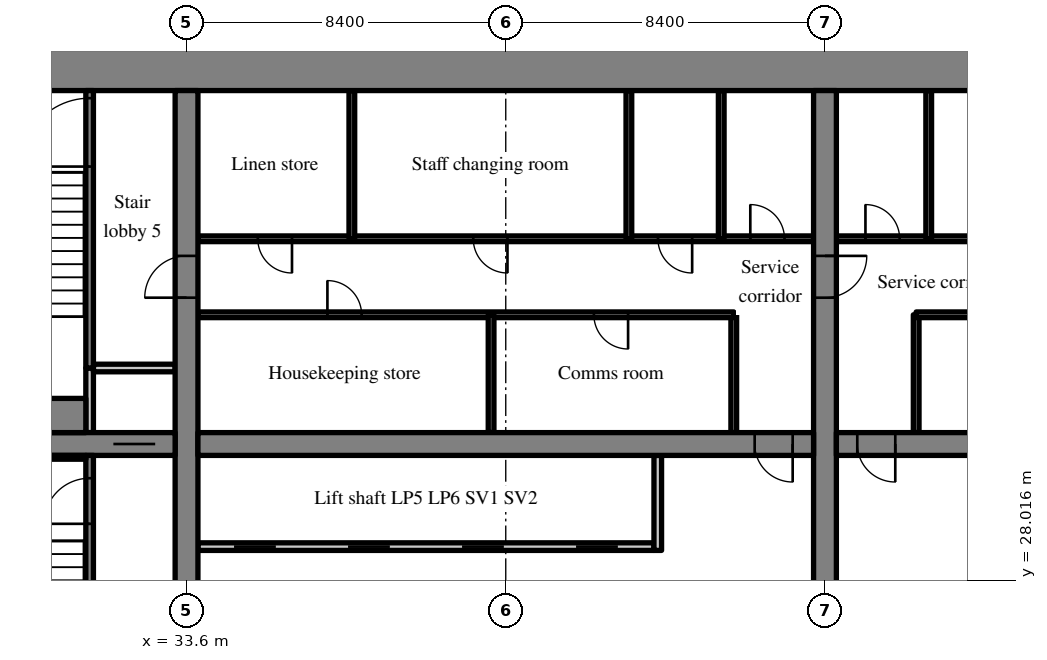
"""IFC4 building model, lengths in metres.
Left out: names, types, materials, properties, quantities, classifications, styles, units other than length and angle.
Written with IfcOpenShell. Run it as: python <this file> out.ifc"""

import sys

from ifc_helpers import new_model, si_unit, direction, frame, frame_2d, origin, place, context, subcontext, project, spatial, rectangle, extrude, source, transform, mapped, element, fill, save


model = new_model("IFC4")
c1 = context("Model", 3, precision=1e-05, world=origin(), true_north=direction((0.0, 1.0)))
c2 = subcontext(c1, "Body", "Model", "MODEL_VIEW")
j1 = project(units=[si_unit("LENGTHUNIT", "METRE"), si_unit("PLANEANGLEUNIT", "RADIAN")], contexts=[c1])
p1 = place(None, origin())
s1 = spatial("IfcSite", under=j1, at=p1, CompositionType="ELEMENT")
p2 = place(p1, origin())
s2 = spatial("IfcBuilding", under=s1, at=p2, CompositionType="ELEMENT")
p3 = place(p2, frame((0.0, 0.0, 31.6)))
s3 = spatial("IfcBuildingStorey", under=s2, at=p3, CompositionType="ELEMENT", Elevation=31.6)
m1 = source(origin(), c2, "Body", "SweptSolid", [
    extrude(rectangle(XDim=50.4, YDim=1.1, at=frame_2d((25.2, 0.0))), origin(), (0.0, 0.0, 1.0), 3.52),
])
p4 = place(p3, frame((25.2, 41.45, 0.0), z_axis=(0.0, 0.0, 1.0), x_axis=(1.0, 0.0, 0.0)))
e1 = element("IfcWall", 1, at=p4, inside=s3, PredefinedType="SHEAR", context=c2, shape_type="MappedRepresentation", body=[
    mapped(m1, transform((0.0, 0.0, 0.0), scale=1.0)),
])
m2 = source(origin(), c2, "Body", "SweptSolid", [
    extrude(rectangle(XDim=17.8, YDim=0.6, at=frame_2d((8.9, 0.0))), origin(), (0.0, 0.0, 1.0), 3.52),
])
p5 = place(p3, frame((33.6, 23.1, 0.0), z_axis=(0.0, 0.0, 1.0), x_axis=(0.0, 1.0, 0.0)))
e2 = element("IfcWall", 2, at=p5, inside=s3, PredefinedType="SHEAR", context=c2, shape_type="MappedRepresentation", body=[
    mapped(m2, transform((0.0, 0.0, 0.0), scale=1.0)),
])
m3 = source(origin(), c2, "Body", "SweptSolid", [
    extrude(rectangle(XDim=1.1, YDim=2.1, at=frame_2d((0.55, 1.05))), frame((0.0, 0.31, 0.0), z_axis=(0.0, -1.0, 0.0), x_axis=(1.0, 0.0, 0.0)), (0.0, 0.0, 1.0), 0.62),
])
p6 = place(p5, frame((12.35, 0.0, 0.0)))
e3 = element("IfcOpeningElement", 3, at=p6, cuts=e2, PredefinedType="OPENING", context=c2, shape_type="MappedRepresentation", body=[
    mapped(m3, transform((0.0, 0.0, 0.0), scale=1.0)),
])
p7 = place(p3, frame((50.4, 23.1, 0.0), z_axis=(0.0, 0.0, 1.0), x_axis=(0.0, 1.0, 0.0)))
e4 = element("IfcWall", 4, at=p7, inside=s3, PredefinedType="SHEAR", context=c2, shape_type="MappedRepresentation", body=[
    mapped(m2, transform((0.0, 0.0, 0.0), scale=1.0)),
])
p8 = place(p7, frame((12.35, 0.0, 0.0)))
e5 = element("IfcOpeningElement", 5, at=p8, cuts=e4, PredefinedType="OPENING", context=c2, shape_type="MappedRepresentation", body=[
    mapped(m3, transform((0.0, 0.0, 0.0), scale=1.0)),
])
m4 = source(origin(), c2, "Body", "SweptSolid", [
    extrude(rectangle(XDim=7.0, YDim=0.6, at=frame_2d((3.5, 0.0))), origin(), (0.0, 0.0, 1.0), 3.52),
])
p9 = place(p3, frame((26.3, 31.6, 0.0), z_axis=(0.0, 0.0, 1.0), x_axis=(1.0, 0.0, 0.0)))
e6 = element("IfcWall", 6, at=p9, inside=s3, PredefinedType="SHEAR", context=c2, shape_type="MappedRepresentation", body=[
    mapped(m4, transform((0.0, 0.0, 0.0), scale=1.0)),
])
p10 = place(p9, frame((5.375, 0.0, 0.0)))
e7 = element("IfcOpeningElement", 7, at=p10, cuts=e6, PredefinedType="OPENING", context=c2, shape_type="MappedRepresentation", body=[
    mapped(m3, transform((0.0, 0.0, 0.0), scale=1.0)),
])
m5 = source(origin(), c2, "Body", "SweptSolid", [
    extrude(rectangle(XDim=16.2, YDim=0.6, at=frame_2d((8.1, 0.0))), origin(), (0.0, 0.0, 1.0), 3.52),
])
p11 = place(p3, frame((33.9, 31.6, 0.0), z_axis=(0.0, 0.0, 1.0), x_axis=(1.0, 0.0, 0.0)))
e8 = element("IfcWall", 8, at=p11, inside=s3, PredefinedType="SHEAR", context=c2, shape_type="MappedRepresentation", body=[
    mapped(m5, transform((0.0, 0.0, 0.0), scale=1.0)),
])
m6 = source(origin(), c2, "Body", "SweptSolid", [
    extrude(rectangle(XDim=1.0, YDim=2.1, at=frame_2d((0.5, 1.05))), frame((0.0, 0.31, 0.0), z_axis=(0.0, -1.0, 0.0), x_axis=(1.0, 0.0, 0.0)), (0.0, 0.0, 1.0), 0.62),
])
p12 = place(p11, frame((14.65, 0.0, 0.0)))
e9 = element("IfcOpeningElement", 9, at=p12, cuts=e8, PredefinedType="OPENING", context=c2, shape_type="MappedRepresentation", body=[
    mapped(m6, transform((0.0, 0.0, 0.0), scale=1.0)),
])
m7 = source(origin(), c2, "Body", "SweptSolid", [
    extrude(rectangle(XDim=16.2, YDim=0.6, at=frame_2d((8.1, 0.0))), origin(), (0.0, 0.0, 1.0), 3.52),
])
p13 = place(p3, frame((50.7, 31.6, 0.0), z_axis=(0.0, 0.0, 1.0), x_axis=(1.0, 0.0, 0.0)))
e10 = element("IfcWall", 10, at=p13, inside=s3, PredefinedType="SHEAR", context=c2, shape_type="MappedRepresentation", body=[
    mapped(m7, transform((0.0, 0.0, 0.0), scale=1.0)),
])
p14 = place(p13, frame((0.55, 0.0, 0.0)))
e11 = element("IfcOpeningElement", 11, at=p14, cuts=e10, PredefinedType="OPENING", context=c2, shape_type="MappedRepresentation", body=[
    mapped(m6, transform((0.0, 0.0, 0.0), scale=1.0)),
])
m8 = source(origin(), c2, "Body", "SweptSolid", [
    extrude(rectangle(XDim=12.0, YDim=0.2, at=frame_2d((6.0, 0.0))), origin(), (0.0, 0.0, 1.0), 3.52),
])
p15 = place(p3, frame((33.9, 28.9, 0.0), z_axis=(0.0, 0.0, 1.0), x_axis=(1.0, 0.0, 0.0)))
e12 = element("IfcWall", 12, at=p15, inside=s3, PredefinedType="SOLIDWALL", context=c2, shape_type="MappedRepresentation", body=[
    mapped(m8, transform((0.0, 0.0, 0.0), scale=1.0)),
])
m9 = source(origin(), c2, "Body", "SweptSolid", [
    extrude(rectangle(XDim=1.1, YDim=2.1, at=frame_2d((0.55, 1.05))), frame((0.0, 0.11, 0.0), z_axis=(0.0, -1.0, 0.0), x_axis=(1.0, 0.0, 0.0)), (0.0, 0.0, 1.0), 0.22),
])
p16 = place(p15, frame((0.95, 0.0, 0.0)))
e13 = element("IfcOpeningElement", 13, at=p16, cuts=e12, PredefinedType="OPENING", context=c2, shape_type="MappedRepresentation", body=[
    mapped(m9, transform((0.0, 0.0, 0.0), scale=1.0)),
])
p17 = place(p15, frame((3.95, 0.0, 0.0)))
e14 = element("IfcOpeningElement", 14, at=p17, cuts=e12, PredefinedType="OPENING", context=c2, shape_type="MappedRepresentation", body=[
    mapped(m9, transform((0.0, 0.0, 0.0), scale=1.0)),
])
p18 = place(p15, frame((6.95, 0.0, 0.0)))
e15 = element("IfcOpeningElement", 15, at=p18, cuts=e12, PredefinedType="OPENING", context=c2, shape_type="MappedRepresentation", body=[
    mapped(m9, transform((0.0, 0.0, 0.0), scale=1.0)),
])
p19 = place(p15, frame((9.95, 0.0, 0.0)))
e16 = element("IfcOpeningElement", 16, at=p19, cuts=e12, PredefinedType="OPENING", context=c2, shape_type="MappedRepresentation", body=[
    mapped(m9, transform((0.0, 0.0, 0.0), scale=1.0)),
])
m10 = source(origin(), c2, "Body", "SweptSolid", [
    extrude(rectangle(XDim=2.5, YDim=0.2, at=frame_2d((1.25, 0.0))), origin(), (0.0, 0.0, 1.0), 3.52),
])
p20 = place(p3, frame((46.0, 28.8, 0.0), z_axis=(0.0, 0.0, 1.0), x_axis=(0.0, 1.0, 0.0)))
e17 = element("IfcWall", 17, at=p20, inside=s3, PredefinedType="SOLIDWALL", context=c2, shape_type="MappedRepresentation", body=[
    mapped(m10, transform((0.0, 0.0, 0.0), scale=1.0)),
])
m11 = source(origin(), c2, "Body", "SweptSolid", [
    extrude(rectangle(XDim=3.1, YDim=0.15, at=frame_2d((1.55, 0.0))), origin(), (0.0, 0.0, 1.0), 3.52),
])
p21 = place(p3, frame((48.0, 31.9, 0.0), z_axis=(0.0, 0.0, 1.0), x_axis=(0.0, 1.0, 0.0)))
e18 = element("IfcWall", 18, at=p21, inside=s3, PredefinedType="PARTITIONING", context=c2, shape_type="MappedRepresentation", body=[
    mapped(m11, transform((0.0, 0.0, 0.0), scale=1.0)),
])
m12 = source(origin(), c2, "Body", "SweptSolid", [
    extrude(rectangle(XDim=14.1, YDim=0.15, at=frame_2d((7.05, 0.0))), origin(), (0.0, 0.0, 1.0), 3.52),
])
p22 = place(p3, frame((33.9, 35.0, 0.0), z_axis=(0.0, 0.0, 1.0), x_axis=(1.0, 0.0, 0.0)))
e19 = element("IfcWall", 19, at=p22, inside=s3, PredefinedType="PARTITIONING", context=c2, shape_type="MappedRepresentation", body=[
    mapped(m12, transform((0.0, 0.0, 0.0), scale=1.0)),
])
m13 = source(origin(), c2, "Body", "SweptSolid", [
    extrude(rectangle(XDim=0.9, YDim=2.1, at=frame_2d((0.45, 1.05))), frame((0.0, 0.085, 0.0), z_axis=(0.0, -1.0, 0.0), x_axis=(1.0, 0.0, 0.0)), (0.0, 0.0, 1.0), 0.17),
])
p23 = place(p22, frame((3.407, 0.0, 0.0)))
e20 = element("IfcOpeningElement", 20, at=p23, cuts=e19, PredefinedType="OPENING", context=c2, shape_type="MappedRepresentation", body=[
    mapped(m13, transform((0.0, 0.0, 0.0), scale=1.0)),
])
p24 = place(p22, frame((10.419, 0.0, 0.0)))
e21 = element("IfcOpeningElement", 21, at=p24, cuts=e19, PredefinedType="OPENING", context=c2, shape_type="MappedRepresentation", body=[
    mapped(m13, transform((0.0, 0.0, 0.0), scale=1.0)),
])
m14 = source(origin(), c2, "Body", "SweptSolid", [
    extrude(rectangle(XDim=16.2, YDim=0.15, at=frame_2d((8.1, 0.0))), origin(), (0.0, 0.0, 1.0), 3.52),
])
p25 = place(p3, frame((33.9, 37.0, 0.0), z_axis=(0.0, 0.0, 1.0), x_axis=(1.0, 0.0, 0.0)))
e22 = element("IfcWall", 22, at=p25, inside=s3, PredefinedType="PARTITIONING", context=c2, shape_type="MappedRepresentation", body=[
    mapped(m14, transform((0.0, 0.0, 0.0), scale=1.0)),
])
p26 = place(p25, frame((1.575, 0.0, 0.0)))
e23 = element("IfcOpeningElement", 23, at=p26, cuts=e22, PredefinedType="OPENING", context=c2, shape_type="MappedRepresentation", body=[
    mapped(m13, transform((0.0, 0.0, 0.0), scale=1.0)),
])
p27 = place(p25, frame((7.245, 0.0, 0.0)))
e24 = element("IfcOpeningElement", 24, at=p27, cuts=e22, PredefinedType="OPENING", context=c2, shape_type="MappedRepresentation", body=[
    mapped(m13, transform((0.0, 0.0, 0.0), scale=1.0)),
])
p28 = place(p25, frame((12.105, 0.0, 0.0)))
e25 = element("IfcOpeningElement", 25, at=p28, cuts=e22, PredefinedType="OPENING", context=c2, shape_type="MappedRepresentation", body=[
    mapped(m13, transform((0.0, 0.0, 0.0), scale=1.0)),
])
p29 = place(p25, frame((14.535, 0.0, 0.0)))
e26 = element("IfcOpeningElement", 26, at=p29, cuts=e22, PredefinedType="OPENING", context=c2, shape_type="MappedRepresentation", body=[
    mapped(m13, transform((0.0, 0.0, 0.0), scale=1.0)),
])
p30 = place(p3, frame((41.614, 31.9, 0.0), z_axis=(0.0, 0.0, 1.0), x_axis=(0.0, 1.0, 0.0)))
e27 = element("IfcWall", 27, at=p30, inside=s3, PredefinedType="PARTITIONING", context=c2, shape_type="MappedRepresentation", body=[
    mapped(m11, transform((0.0, 0.0, 0.0), scale=1.0)),
])
m15 = source(origin(), c2, "Body", "SweptSolid", [
    extrude(rectangle(XDim=3.9, YDim=0.15, at=frame_2d((1.95, 0.0))), origin(), (0.0, 0.0, 1.0), 3.52),
])
for number, where, z_axis, x_axis in (
    (28, (37.95, 37.0, 0.0), (0.0, 0.0, 1.0), (0.0, 1.0, 0.0)),
    (29, (45.24, 37.0, 0.0), (0.0, 0.0, 1.0), (0.0, 1.0, 0.0)),
    (30, (47.67, 37.0, 0.0), (0.0, 0.0, 1.0), (0.0, 1.0, 0.0)),
):
    element("IfcWall", number, at=place(p3, frame(where, z_axis=z_axis, x_axis=x_axis)), inside=s3, PredefinedType="PARTITIONING", context=c2, shape_type="MappedRepresentation", body=[
        mapped(m15, transform((0.0, 0.0, 0.0), scale=1.0)),
    ])
p31 = place(p3, frame((52.8, 31.9, 0.0), z_axis=(0.0, 0.0, 1.0), x_axis=(0.0, 1.0, 0.0)))
e31 = element("IfcWall", 31, at=p31, inside=s3, PredefinedType="PARTITIONING", context=c2, shape_type="MappedRepresentation", body=[
    mapped(m11, transform((0.0, 0.0, 0.0), scale=1.0)),
])
m16 = source(origin(), c2, "Body", "SweptSolid", [
    extrude(rectangle(XDim=14.1, YDim=0.15, at=frame_2d((7.05, 0.0))), origin(), (0.0, 0.0, 1.0), 3.52),
])
p32 = place(p3, frame((66.9, 35.0, 0.0), z_axis=(0.0, 0.0, 1.0), x_axis=(-1.0, 0.0, 0.0)))
e32 = element("IfcWall", 32, at=p32, inside=s3, PredefinedType="PARTITIONING", context=c2, shape_type="MappedRepresentation", body=[
    mapped(m16, transform((0.0, 0.0, 0.0), scale=1.0)),
])
p33 = place(p32, frame((6.562, 0.0, 0.0)))
e33 = element("IfcOpeningElement", 33, at=p33, cuts=e32, PredefinedType="OPENING", context=c2, shape_type="MappedRepresentation", body=[
    mapped(m13, transform((0.0, 0.0, 0.0), scale=1.0)),
])
m17 = source(origin(), c2, "Body", "SweptSolid", [
    extrude(rectangle(XDim=16.2, YDim=0.15, at=frame_2d((8.1, 0.0))), origin(), (0.0, 0.0, 1.0), 3.52),
])
p34 = place(p3, frame((66.9, 37.0, 0.0), z_axis=(0.0, 0.0, 1.0), x_axis=(-1.0, 0.0, 0.0)))
e34 = element("IfcWall", 34, at=p34, inside=s3, PredefinedType="PARTITIONING", context=c2, shape_type="MappedRepresentation", body=[
    mapped(m17, transform((0.0, 0.0, 0.0), scale=1.0)),
])
p35 = place(p34, frame((3.195, 0.0, 0.0)))
e35 = element("IfcOpeningElement", 35, at=p35, cuts=e34, PredefinedType="OPENING", context=c2, shape_type="MappedRepresentation", body=[
    mapped(m13, transform((0.0, 0.0, 0.0), scale=1.0)),
])
p36 = place(p34, frame((8.055, 0.0, 0.0)))
e36 = element("IfcOpeningElement", 36, at=p36, cuts=e34, PredefinedType="OPENING", context=c2, shape_type="MappedRepresentation", body=[
    mapped(m13, transform((0.0, 0.0, 0.0), scale=1.0)),
])
p37 = place(p34, frame((11.295, 0.0, 0.0)))
e37 = element("IfcOpeningElement", 37, at=p37, cuts=e34, PredefinedType="OPENING", context=c2, shape_type="MappedRepresentation", body=[
    mapped(m13, transform((0.0, 0.0, 0.0), scale=1.0)),
])
p38 = place(p34, frame((14.535, 0.0, 0.0)))
e38 = element("IfcOpeningElement", 38, at=p38, cuts=e34, PredefinedType="OPENING", context=c2, shape_type="MappedRepresentation", body=[
    mapped(m13, transform((0.0, 0.0, 0.0), scale=1.0)),
])
p39 = place(p3, frame((53.13, 37.0, 0.0), z_axis=(0.0, 0.0, 1.0), x_axis=(0.0, 1.0, 0.0)))
e39 = element("IfcWall", 39, at=p39, inside=s3, PredefinedType="PARTITIONING", context=c2, shape_type="MappedRepresentation", body=[
    mapped(m15, transform((0.0, 0.0, 0.0), scale=1.0)),
])
m18 = source(origin(), c2, "Body", "SweptSolid", [
    extrude(rectangle(XDim=8.2, YDim=0.2, at=frame_2d((4.1, 0.0))), origin(), (0.0, 0.0, 1.0), 3.52),
])
p40 = place(p3, frame((31.05, 23.1, 0.0), z_axis=(0.0, 0.0, 1.0), x_axis=(0.0, 1.0, 0.0)))
e40 = element("IfcWall", 40, at=p40, inside=s3, PredefinedType="SOLIDWALL", context=c2, shape_type="MappedRepresentation", body=[
    mapped(m18, transform((0.0, 0.0, 0.0), scale=1.0)),
])
m19 = source(origin(), c2, "Body", "SweptSolid", [
    extrude(rectangle(XDim=1.2, YDim=2.1, at=frame_2d((0.6, 1.05))), frame((0.0, 0.11, 0.0), z_axis=(0.0, -1.0, 0.0), x_axis=(1.0, 0.0, 0.0)), (0.0, 0.0, 1.0), 0.22),
])
p41 = place(p40, frame((6.4, 0.0, 0.0)))
e41 = element("IfcOpeningElement", 41, at=p41, cuts=e40, PredefinedType="OPENING", context=c2, shape_type="MappedRepresentation", body=[
    mapped(m19, transform((0.0, 0.0, 0.0), scale=1.0)),
])
m20 = source(origin(), c2, "Body", "SweptSolid", [
    extrude(rectangle(XDim=1.7, YDim=0.2, at=frame_2d((0.85, 0.0))), origin(), (0.0, 0.0, 1.0), 3.52),
])
p42 = place(p3, frame((31.05, 31.9, 0.0), z_axis=(0.0, 0.0, 1.0), x_axis=(0.0, 1.0, 0.0)))
e42 = element("IfcWall", 42, at=p42, inside=s3, PredefinedType="SOLIDWALL", context=c2, shape_type="MappedRepresentation", body=[
    mapped(m20, transform((0.0, 0.0, 0.0), scale=1.0)),
])
m21 = source(origin(), c2, "Body", "SweptSolid", [
    extrude(rectangle(XDim=2.15, YDim=0.2, at=frame_2d((1.075, 0.0))), origin(), (0.0, 0.0, 1.0), 3.52),
])
p43 = place(p3, frame((31.15, 33.6, 0.0), z_axis=(0.0, 0.0, 1.0), x_axis=(1.0, 0.0, 0.0)))
e43 = element("IfcWall", 43, at=p43, inside=s3, PredefinedType="SOLIDWALL", context=c2, shape_type="MappedRepresentation", body=[
    mapped(m21, transform((0.0, 0.0, 0.0), scale=1.0)),
])
m22 = source(origin(), c2, "Body", "SweptSolid", [
    extrude(rectangle(XDim=7.3, YDim=0.2, at=frame_2d((3.65, 0.0))), origin(), (0.0, 0.0, 1.0), 3.52),
])
p44 = place(p3, frame((31.05, 33.6, 0.0), z_axis=(0.0, 0.0, 1.0), x_axis=(0.0, 1.0, 0.0)))
e44 = element("IfcWall", 44, at=p44, inside=s3, PredefinedType="SOLIDWALL", context=c2, shape_type="MappedRepresentation", body=[
    mapped(m22, transform((0.0, 0.0, 0.0), scale=1.0)),
])
m23 = source(origin(), c2, "Body", "SweptSolid", [
    extrude(rectangle(XDim=1.8, YDim=2.1, at=frame_2d((0.9, 1.05))), frame((0.0, 0.11, 0.0), z_axis=(0.0, -1.0, 0.0), x_axis=(1.0, 0.0, 0.0)), (0.0, 0.0, 1.0), 0.22),
])
p45 = place(p44, frame((5.3, 0.0, 0.0)))
e45 = element("IfcOpeningElement", 45, at=p45, cuts=e44, PredefinedType="OPENING", context=c2, shape_type="MappedRepresentation", body=[
    mapped(m23, transform((0.0, 0.0, 0.0), scale=1.0)),
])
m24 = source(origin(), c2, "Body", "SweptSolid", [
    extrude(rectangle(XDim=4.65, YDim=0.1, at=frame_2d((2.325, 0.0))), origin(), (0.0, 0.0, 1.0), 3.52),
])
p46 = place(p3, frame((26.3, 31.25, 0.0), z_axis=(0.0, 0.0, 1.0), x_axis=(1.0, 0.0, 0.0)))
e46 = element("IfcWall", 46, at=p46, inside=s3, PredefinedType="SOLIDWALL", context=c2, shape_type="MappedRepresentation", body=[
    mapped(m24, transform((0.0, 0.0, 0.0), scale=1.0)),
])
m25 = source(origin(), c2, "Body", "SweptSolid", [
    extrude(rectangle(XDim=4.65, YDim=0.9, at=frame_2d((2.325, 0.0))), origin(), (0.0, 0.0, 1.0), 3.52),
])
p47 = place(p3, frame((26.3, 32.35, 0.0), z_axis=(0.0, 0.0, 1.0), x_axis=(1.0, 0.0, 0.0)))
e47 = element("IfcWall", 47, at=p47, inside=s3, PredefinedType="SOLIDWALL", context=c2, shape_type="MappedRepresentation", body=[
    mapped(m25, transform((0.0, 0.0, 0.0), scale=1.0)),
])
m26 = source(origin(), c2, "Body", "SweptSolid", [
    extrude(rectangle(XDim=1.0, YDim=2.1, at=frame_2d((0.5, 1.05))), frame((0.0, 0.025, 0.0), z_axis=(0.0, -1.0, 0.0), x_axis=(1.0, 0.0, 0.0)), (0.0, 0.0, 1.0), 0.05),
])
p48 = place(p12, origin())
e48 = element("IfcDoor", 48, at=p48, inside=s3, OperationType="SINGLE_SWING_RIGHT", PredefinedType="DOOR", context=c2, shape_type="MappedRepresentation", body=[
    mapped(m26, transform((0.0, 0.0, 0.0), scale=1.0)),
])
fill(e9, e48)
m27 = source(origin(), c2, "Body", "SweptSolid", [
    extrude(rectangle(XDim=1.1, YDim=2.1, at=frame_2d((0.55, 1.05))), frame((0.0, 0.025, 0.0), z_axis=(0.0, -1.0, 0.0), x_axis=(1.0, 0.0, 0.0)), (0.0, 0.0, 1.0), 0.05),
])
p49 = place(p16, origin())
e49 = element("IfcDoor", 49, at=p49, inside=s3, OperationType="SLIDING_TO_LEFT", PredefinedType="DOOR", context=c2, shape_type="MappedRepresentation", body=[
    mapped(m27, transform((0.0, 0.0, 0.0), scale=1.0)),
])
fill(e13, e49)
p50 = place(p17, origin())
e50 = element("IfcDoor", 50, at=p50, inside=s3, OperationType="SLIDING_TO_RIGHT", PredefinedType="DOOR", context=c2, shape_type="MappedRepresentation", body=[
    mapped(m27, transform((0.0, 0.0, 0.0), scale=1.0)),
])
fill(e14, e50)
p51 = place(p18, origin())
e51 = element("IfcDoor", 51, at=p51, inside=s3, OperationType="SLIDING_TO_LEFT", PredefinedType="DOOR", context=c2, shape_type="MappedRepresentation", body=[
    mapped(m27, transform((0.0, 0.0, 0.0), scale=1.0)),
])
fill(e15, e51)
p52 = place(p19, origin())
e52 = element("IfcDoor", 52, at=p52, inside=s3, OperationType="SLIDING_TO_RIGHT", PredefinedType="DOOR", context=c2, shape_type="MappedRepresentation", body=[
    mapped(m27, transform((0.0, 0.0, 0.0), scale=1.0)),
])
fill(e16, e52)
m28 = source(origin(), c2, "Body", "SweptSolid", [
    extrude(rectangle(XDim=0.9, YDim=2.1, at=frame_2d((0.45, 1.05))), frame((0.0, 0.025, 0.0), z_axis=(0.0, -1.0, 0.0), x_axis=(1.0, 0.0, 0.0)), (0.0, 0.0, 1.0), 0.05),
])
p53 = place(p23, origin())
e53 = element("IfcDoor", 53, at=p53, inside=s3, OperationType="SINGLE_SWING_LEFT", PredefinedType="DOOR", context=c2, shape_type="MappedRepresentation", body=[
    mapped(m28, transform((0.0, 0.0, 0.0), scale=1.0)),
])
fill(e20, e53)
p54 = place(p24, origin())
e54 = element("IfcDoor", 54, at=p54, inside=s3, OperationType="SINGLE_SWING_RIGHT", PredefinedType="DOOR", context=c2, shape_type="MappedRepresentation", body=[
    mapped(m28, transform((0.0, 0.0, 0.0), scale=1.0)),
])
fill(e21, e54)
p55 = place(p26, origin())
e55 = element("IfcDoor", 55, at=p55, inside=s3, OperationType="SINGLE_SWING_RIGHT", PredefinedType="DOOR", context=c2, shape_type="MappedRepresentation", body=[
    mapped(m28, transform((0.0, 0.0, 0.0), scale=1.0)),
])
fill(e23, e55)
p56 = place(p27, origin())
e56 = element("IfcDoor", 56, at=p56, inside=s3, OperationType="SINGLE_SWING_RIGHT", PredefinedType="DOOR", context=c2, shape_type="MappedRepresentation", body=[
    mapped(m28, transform((0.0, 0.0, 0.0), scale=1.0)),
])
fill(e24, e56)
p57 = place(p28, origin())
e57 = element("IfcDoor", 57, at=p57, inside=s3, OperationType="SINGLE_SWING_RIGHT", PredefinedType="DOOR", context=c2, shape_type="MappedRepresentation", body=[
    mapped(m28, transform((0.0, 0.0, 0.0), scale=1.0)),
])
fill(e25, e57)
p58 = place(p29, origin())
e58 = element("IfcDoor", 58, at=p58, inside=s3, OperationType="SINGLE_SWING_LEFT", PredefinedType="DOOR", context=c2, shape_type="MappedRepresentation", body=[
    mapped(m28, transform((0.0, 0.0, 0.0), scale=1.0)),
])
fill(e26, e58)
p59 = place(p14, origin())
e59 = element("IfcDoor", 59, at=p59, inside=s3, OperationType="SINGLE_SWING_RIGHT", PredefinedType="DOOR", context=c2, shape_type="MappedRepresentation", body=[
    mapped(m26, transform((0.0, 0.0, 0.0), scale=1.0)),
])
fill(e11, e59)
p60 = place(p38, origin())
e60 = element("IfcDoor", 60, at=p60, inside=s3, OperationType="SINGLE_SWING_RIGHT", PredefinedType="DOOR", context=c2, shape_type="MappedRepresentation", body=[
    mapped(m28, transform((0.0, 0.0, 0.0), scale=1.0)),
])
fill(e38, e60)
m29 = source(origin(), c2, "Body", "SweptSolid", [
    extrude(rectangle(XDim=1.2, YDim=2.1, at=frame_2d((0.6, 1.05))), frame((0.0, 0.025, 0.0), z_axis=(0.0, -1.0, 0.0), x_axis=(1.0, 0.0, 0.0)), (0.0, 0.0, 1.0), 0.05),
])
p61 = place(p41, origin())
e61 = element("IfcDoor", 61, at=p61, inside=s3, OperationType="SINGLE_SWING_LEFT", PredefinedType="DOOR", context=c2, shape_type="MappedRepresentation", body=[
    mapped(m29, transform((0.0, 0.0, 0.0), scale=1.0)),
])
fill(e41, e61)
p62 = place(p10, origin())
e62 = element("IfcDoor", 62, at=p62, inside=s3, OperationType="SLIDING_TO_RIGHT", PredefinedType="DOOR", context=c2, shape_type="MappedRepresentation", body=[
    mapped(m27, transform((0.0, 0.0, 0.0), scale=1.0)),
])
fill(e7, e62)
m30 = source(origin(), c2, "Body", "SweptSolid", [
    extrude(rectangle(XDim=1.8, YDim=2.1, at=frame_2d((0.9, 1.05))), frame((0.0, 0.025, 0.0), z_axis=(0.0, -1.0, 0.0), x_axis=(1.0, 0.0, 0.0)), (0.0, 0.0, 1.0), 0.05),
])
p63 = place(p45, origin())
e63 = element("IfcDoor", 63, at=p63, inside=s3, OperationType="SINGLE_SWING_LEFT", PredefinedType="DOOR", context=c2, shape_type="MappedRepresentation", body=[
    mapped(m30, transform((0.0, 0.0, 0.0), scale=1.0)),
])
fill(e45, e63)
p64 = place(p6, origin())
e64 = element("IfcDoor", 64, at=p64, inside=s3, OperationType="SINGLE_SWING_LEFT", PredefinedType="DOOR", context=c2, shape_type="MappedRepresentation", body=[
    mapped(m27, transform((0.0, 0.0, 0.0), scale=1.0)),
])
fill(e3, e64)
p65 = place(p8, origin())
e65 = element("IfcDoor", 65, at=p65, inside=s3, OperationType="SINGLE_SWING_RIGHT", PredefinedType="DOOR", context=c2, shape_type="MappedRepresentation", body=[
    mapped(m27, transform((0.0, 0.0, 0.0), scale=1.0)),
])
fill(e5, e65)
save(model, sys.argv[1])
